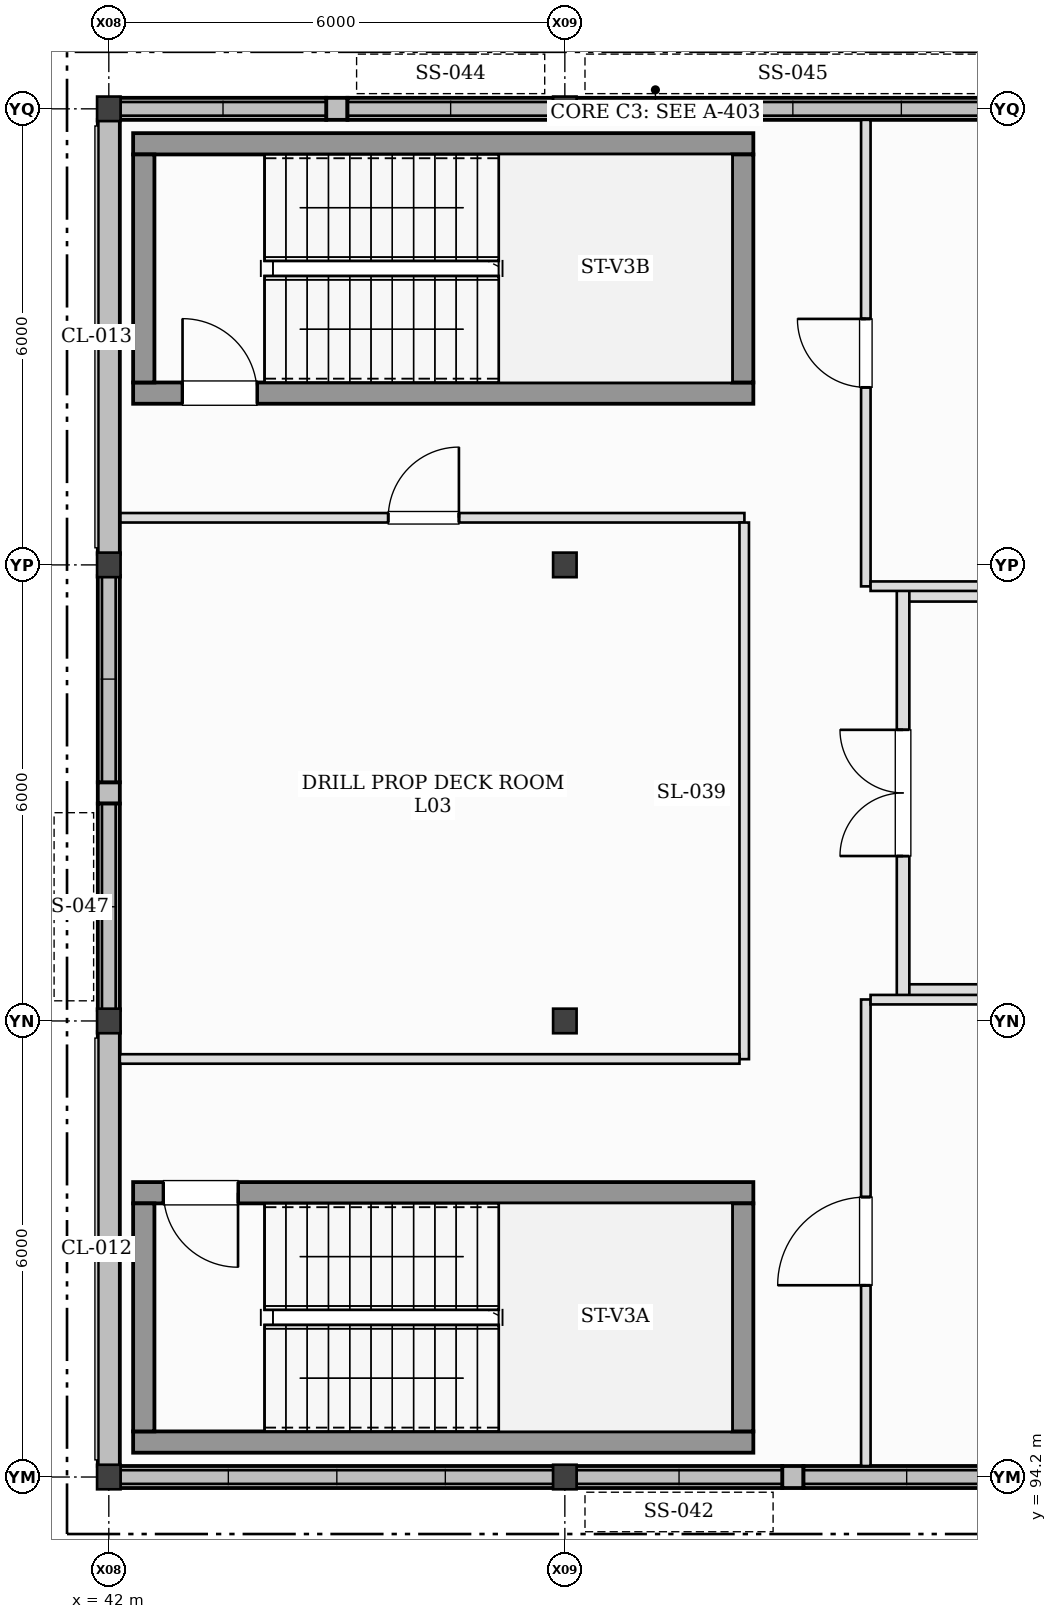
"""IFC4 building model, lengths in metres.
Left out: names, types, materials, properties, quantities, classifications, styles, units other than length and angle.
Written with IfcOpenShell. Run it as: python <this file> out.ifc"""

import sys

from ifc_helpers import new_model, si_unit, direction, frame, frame_2d, origin, origin_2d, place, context, subcontext, project, spatial, rectangle, i_section, extrude, element, fill, save


model = new_model("IFC4")
c1 = context("Model", 3, precision=1e-05, world=origin(), true_north=direction((0.0, 1.0)))
c2 = subcontext(c1, "Body", "Model", "MODEL_VIEW")
j1 = project(units=[si_unit("LENGTHUNIT", "METRE"), si_unit("PLANEANGLEUNIT", "RADIAN")], contexts=[c1])
p1 = place(None, origin())
s1 = spatial("IfcSite", under=j1, at=p1, CompositionType="ELEMENT")
p2 = place(p1, origin())
s2 = spatial("IfcBuilding", under=s1, at=p2, CompositionType="ELEMENT")
p3 = place(p2, frame((0.0, 0.0, 10.0)))
s3 = spatial("IfcBuildingStorey", under=s2, at=p3, CompositionType="ELEMENT", Elevation=10.0)
for number, where, z_axis, x_axis in (
    (1, (42.0, 94.2, 0.0), (0.0, 0.0, 1.0), (1.0, 0.0, 0.0)),
    (2, (42.0, 100.2, 0.0), (0.0, 0.0, 1.0), (1.0, 0.0, 0.0)),
    (3, (42.0, 106.2, 0.0), (0.0, 0.0, 1.0), (1.0, 0.0, 0.0)),
    (4, (42.0, 112.2, 0.0), (0.0, 0.0, 1.0), (1.0, 0.0, 0.0)),
    (5, (48.0, 94.2, 0.0), (0.0, 0.0, 1.0), (1.0, 0.0, 0.0)),
    (6, (48.0, 100.2, 0.0), (0.0, 0.0, 1.0), (1.0, 0.0, 0.0)),
    (7, (48.0, 106.2, 0.0), (0.0, 0.0, 1.0), (1.0, 0.0, 0.0)),
    (8, (48.0, 112.2, 0.0), (0.0, 0.0, 1.0), (1.0, 0.0, 0.0)),
):
    element("IfcColumn", number, at=place(p3, frame(where, z_axis=z_axis, x_axis=x_axis)), inside=s3, PredefinedType="COLUMN", context=c2, shape_type="SweptSolid", body=[
        extrude(i_section(OverallWidth=0.309, OverallDepth=0.323, WebThickness=0.013, FlangeThickness=0.023, at=origin_2d()), origin(), (0.0, 0.0, 1.0), 4.0),
    ])
p4 = place(p3, frame((42.145, 94.2, 0.0), z_axis=(0.0, 0.0, 1.0), x_axis=(1.0, 0.0, 0.0)))
e9 = element("IfcWall", 9, at=p4, inside=s3, PredefinedType="STANDARD", context=c2, shape_type="SweptSolid", body=[
    extrude(rectangle(XDim=5.71, YDim=0.29, at=frame_2d((2.855, 0.0))), origin(), (0.0, 0.0, 1.0), 0.68),
])
p5 = place(p3, frame((50.86, 94.2, 0.0), z_axis=(0.0, 0.0, 1.0), x_axis=(1.0, 0.0, 0.0)))
e10 = element("IfcWall", 10, at=p5, inside=s3, PredefinedType="STANDARD", context=c2, shape_type="SweptSolid", body=[
    extrude(rectangle(XDim=0.28, YDim=0.29, at=frame_2d((0.14, 0.0))), origin(), (0.0, 0.0, 1.0), 3.249),
])
p6 = place(p3, frame((48.145, 94.2, 0.0), z_axis=(0.0, 0.0, 1.0), x_axis=(1.0, 0.0, 0.0)))
e11 = element("IfcWall", 11, at=p6, inside=s3, PredefinedType="STANDARD", context=c2, shape_type="SweptSolid", body=[
    extrude(rectangle(XDim=2.715, YDim=0.29, at=frame_2d((1.357, 0.0))), origin(), (0.0, 0.0, 1.0), 0.8),
])
p7 = place(p3, frame((51.14, 94.2, 0.0), z_axis=(0.0, 0.0, 1.0), x_axis=(1.0, 0.0, 0.0)))
e12 = element("IfcWall", 12, at=p7, inside=s3, PredefinedType="STANDARD", context=c2, shape_type="SweptSolid", body=[
    extrude(rectangle(XDim=2.715, YDim=0.29, at=frame_2d((1.357, 0.0))), origin(), (0.0, 0.0, 1.0), 0.92),
])
p8 = place(p3, frame((45.14, 112.2, 0.0), z_axis=(0.0, 0.0, 1.0), x_axis=(-1.0, 0.0, 0.0)))
e13 = element("IfcWall", 13, at=p8, inside=s3, PredefinedType="STANDARD", context=c2, shape_type="SweptSolid", body=[
    extrude(rectangle(XDim=0.28, YDim=0.29, at=frame_2d((0.14, 0.0))), origin(), (0.0, 0.0, 1.0), 3.249),
])
p9 = place(p3, frame((47.855, 112.2, 0.0), z_axis=(0.0, 0.0, 1.0), x_axis=(-1.0, 0.0, 0.0)))
e14 = element("IfcWall", 14, at=p9, inside=s3, PredefinedType="STANDARD", context=c2, shape_type="SweptSolid", body=[
    extrude(rectangle(XDim=2.715, YDim=0.29, at=frame_2d((1.357, 0.0))), origin(), (0.0, 0.0, 1.0), 0.32),
])
p10 = place(p3, frame((44.86, 112.2, 0.0), z_axis=(0.0, 0.0, 1.0), x_axis=(-1.0, 0.0, 0.0)))
e15 = element("IfcWall", 15, at=p10, inside=s3, PredefinedType="STANDARD", context=c2, shape_type="SweptSolid", body=[
    extrude(rectangle(XDim=2.715, YDim=0.29, at=frame_2d((1.357, 0.0))), origin(), (0.0, 0.0, 1.0), 0.44),
])
p11 = place(p3, frame((53.855, 112.2, 0.0), z_axis=(0.0, 0.0, 1.0), x_axis=(-1.0, 0.0, 0.0)))
e16 = element("IfcWall", 16, at=p11, inside=s3, PredefinedType="STANDARD", context=c2, shape_type="SweptSolid", body=[
    extrude(rectangle(XDim=5.71, YDim=0.29, at=frame_2d((2.855, 0.0))), origin(), (0.0, 0.0, 1.0), 0.56),
])
p12 = place(p3, frame((42.0, 100.055, 0.0), z_axis=(0.0, 0.0, 1.0), x_axis=(0.0, -1.0, 0.0)))
e17 = element("IfcWall", 17, at=p12, inside=s3, PredefinedType="STANDARD", context=c2, shape_type="SweptSolid", body=[
    extrude(rectangle(XDim=5.71, YDim=0.29, at=frame_2d((2.855, 0.0))), origin(), (0.0, 0.0, 1.0), 3.253),
])
p13 = place(p3, frame((42.0, 103.34, 0.0), z_axis=(0.0, 0.0, 1.0), x_axis=(0.0, -1.0, 0.0)))
e18 = element("IfcWall", 18, at=p13, inside=s3, PredefinedType="STANDARD", context=c2, shape_type="SweptSolid", body=[
    extrude(rectangle(XDim=0.28, YDim=0.29, at=frame_2d((0.14, 0.0))), origin(), (0.0, 0.0, 1.0), 3.253),
])
p14 = place(p3, frame((42.0, 106.055, 0.0), z_axis=(0.0, 0.0, 1.0), x_axis=(0.0, -1.0, 0.0)))
e19 = element("IfcWall", 19, at=p14, inside=s3, PredefinedType="STANDARD", context=c2, shape_type="SweptSolid", body=[
    extrude(rectangle(XDim=2.715, YDim=0.29, at=frame_2d((1.357, 0.0))), origin(), (0.0, 0.0, 1.0), 0.68),
])
p15 = place(p3, frame((42.0, 103.06, 0.0), z_axis=(0.0, 0.0, 1.0), x_axis=(0.0, -1.0, 0.0)))
e20 = element("IfcWall", 20, at=p15, inside=s3, PredefinedType="STANDARD", context=c2, shape_type="SweptSolid", body=[
    extrude(rectangle(XDim=2.715, YDim=0.29, at=frame_2d((1.357, 0.0))), origin(), (0.0, 0.0, 1.0), 0.8),
])
p16 = place(p3, frame((42.0, 112.055, 0.0), z_axis=(0.0, 0.0, 1.0), x_axis=(0.0, -1.0, 0.0)))
e21 = element("IfcWall", 21, at=p16, inside=s3, PredefinedType="STANDARD", context=c2, shape_type="SweptSolid", body=[
    extrude(rectangle(XDim=5.71, YDim=0.29, at=frame_2d((2.855, 0.0))), origin(), (0.0, 0.0, 1.0), 3.253),
])
p17 = place(p3, frame((42.32, 94.66, 0.0), z_axis=(0.0, 0.0, 1.0), x_axis=(1.0, 0.0, 0.0)))
e22 = element("IfcWall", 22, at=p17, inside=s3, PredefinedType="SHEAR", context=c2, shape_type="SweptSolid", body=[
    extrude(rectangle(XDim=8.16, YDim=0.28, at=frame_2d((4.08, 0.0))), origin(), (0.0, 0.0, 1.0), 4.0),
])
p18 = place(p3, frame((50.48, 97.94, 0.0), z_axis=(0.0, 0.0, 1.0), x_axis=(-1.0, 0.0, 0.0)))
e23 = element("IfcWall", 23, at=p18, inside=s3, PredefinedType="SHEAR", context=c2, shape_type="SweptSolid", body=[
    extrude(rectangle(XDim=8.16, YDim=0.28, at=frame_2d((4.08, 0.0))), origin(), (0.0, 0.0, 1.0), 4.0),
])
p19 = place(p18, frame((6.78, 0.0, 0.0)))
e24 = element("IfcOpeningElement", 24, at=p19, cuts=e23, PredefinedType="OPENING", context=c2, shape_type="SweptSolid", body=[
    extrude(rectangle(XDim=0.98, YDim=2.15, at=frame_2d((0.49, 1.075))), frame((0.0, 0.15, 0.0), z_axis=(0.0, -1.0, 0.0), x_axis=(1.0, 0.0, 0.0)), (0.0, 0.0, 1.0), 0.3),
])
for number, where, z_axis, x_axis in (
    (25, (42.46, 97.8, 0.0), (0.0, 0.0, 1.0), (0.0, -1.0, 0.0)),
    (26, (50.34, 94.8, 0.0), (0.0, 0.0, 1.0), (0.0, 1.0, 0.0)),
):
    element("IfcWall", number, at=place(p3, frame(where, z_axis=z_axis, x_axis=x_axis)), inside=s3, PredefinedType="SHEAR", context=c2, shape_type="SweptSolid", body=[
        extrude(rectangle(XDim=3.0, YDim=0.28, at=frame_2d((1.5, 0.0))), origin(), (0.0, 0.0, 1.0), 4.0),
    ])
p20 = place(p3, frame((42.32, 108.46, 0.0), z_axis=(0.0, 0.0, 1.0), x_axis=(1.0, 0.0, 0.0)))
e27 = element("IfcWall", 27, at=p20, inside=s3, PredefinedType="SHEAR", context=c2, shape_type="SweptSolid", body=[
    extrude(rectangle(XDim=8.16, YDim=0.28, at=frame_2d((4.08, 0.0))), origin(), (0.0, 0.0, 1.0), 4.0),
])
p21 = place(p20, frame((0.65, 0.0, 0.0)))
e28 = element("IfcOpeningElement", 28, at=p21, cuts=e27, PredefinedType="OPENING", context=c2, shape_type="SweptSolid", body=[
    extrude(rectangle(XDim=0.98, YDim=2.15, at=frame_2d((0.49, 1.075))), frame((0.0, 0.15, 0.0), z_axis=(0.0, -1.0, 0.0), x_axis=(1.0, 0.0, 0.0)), (0.0, 0.0, 1.0), 0.3),
])
p22 = place(p3, frame((50.48, 111.74, 0.0), z_axis=(0.0, 0.0, 1.0), x_axis=(-1.0, 0.0, 0.0)))
e29 = element("IfcWall", 29, at=p22, inside=s3, PredefinedType="SHEAR", context=c2, shape_type="SweptSolid", body=[
    extrude(rectangle(XDim=8.16, YDim=0.28, at=frame_2d((4.08, 0.0))), origin(), (0.0, 0.0, 1.0), 4.0),
])
for number, where, z_axis, x_axis in (
    (30, (42.46, 111.6, 0.0), (0.0, 0.0, 1.0), (0.0, -1.0, 0.0)),
    (31, (50.34, 108.6, 0.0), (0.0, 0.0, 1.0), (0.0, 1.0, 0.0)),
):
    element("IfcWall", number, at=place(p3, frame(where, z_axis=z_axis, x_axis=x_axis)), inside=s3, PredefinedType="SHEAR", context=c2, shape_type="SweptSolid", body=[
        extrude(rectangle(XDim=3.0, YDim=0.28, at=frame_2d((1.5, 0.0))), origin(), (0.0, 0.0, 1.0), 4.0),
    ])
for number, where, z_axis, x_axis in (
    (32, (52.45, 100.6, 0.0), (0.0, 0.0, 1.0), (1.0, 0.0, 0.0)),
    (33, (56.448, 105.8, 0.0), (0.0, 0.0, 1.0), (-1.0, 0.0, 0.0)),
):
    element("IfcWall", number, at=place(p3, frame(where, z_axis=z_axis, x_axis=x_axis)), inside=s3, PredefinedType="PARTITIONING", context=c2, shape_type="SweptSolid", body=[
        extrude(rectangle(XDim=3.998, YDim=0.165, at=frame_2d((1.999, 0.0))), origin(), (0.0, 0.0, 1.0), 3.74),
    ])
p23 = place(p3, frame((52.45, 100.52, 0.0), z_axis=(0.0, 0.0, 1.0), x_axis=(0.0, 1.0, 0.0)))
e34 = element("IfcWall", 34, at=p23, inside=s3, PredefinedType="PARTITIONING", context=c2, shape_type="SweptSolid", body=[
    extrude(rectangle(XDim=5.36, YDim=0.165, at=frame_2d((2.68, 0.0))), origin(), (0.0, 0.0, 1.0), 3.74),
])
p24 = place(p23, frame((1.85, 0.0, 0.0)))
e35 = element("IfcOpeningElement", 35, at=p24, cuts=e34, PredefinedType="OPENING", context=c2, shape_type="SweptSolid", body=[
    extrude(rectangle(XDim=1.66, YDim=2.2, at=frame_2d((0.83, 1.1))), frame((0.0, 0.093, 0.0), z_axis=(0.0, -1.0, 0.0), x_axis=(1.0, 0.0, 0.0)), (0.0, 0.0, 1.0), 0.185),
])
p25 = place(p3, frame((42.145, 106.82, 0.0), z_axis=(0.0, 0.0, 1.0), x_axis=(1.0, 0.0, 0.0)))
e36 = element("IfcWall", 36, at=p25, inside=s3, PredefinedType="PARTITIONING", context=c2, shape_type="SweptSolid", body=[
    extrude(rectangle(XDim=8.218, YDim=0.125, at=frame_2d((4.109, 0.0))), origin(), (0.0, 0.0, 1.0), 3.74),
])
p26 = place(p25, frame((3.531, 0.0, 0.0)))
e37 = element("IfcOpeningElement", 37, at=p26, cuts=e36, PredefinedType="OPENING", context=c2, shape_type="SweptSolid", body=[
    extrude(rectangle(XDim=0.93, YDim=2.1, at=frame_2d((0.465, 1.05))), frame((0.0, 0.073, 0.0), z_axis=(0.0, -1.0, 0.0), x_axis=(1.0, 0.0, 0.0)), (0.0, 0.0, 1.0), 0.145),
])
p27 = place(p3, frame((50.36, 106.758, 0.0), z_axis=(0.0, 0.0, 1.0), x_axis=(0.0, -1.0, 0.0)))
e38 = element("IfcWall", 38, at=p27, inside=s3, PredefinedType="PARTITIONING", context=c2, shape_type="SweptSolid", body=[
    extrude(rectangle(XDim=7.06, YDim=0.125, at=frame_2d((3.53, 0.0))), origin(), (0.0, 0.0, 1.0), 3.74),
])
p28 = place(p3, frame((50.298, 99.7, 0.0), z_axis=(0.0, 0.0, 1.0), x_axis=(-1.0, 0.0, 0.0)))
e39 = element("IfcWall", 39, at=p28, inside=s3, PredefinedType="PARTITIONING", context=c2, shape_type="SweptSolid", body=[
    extrude(rectangle(XDim=8.153, YDim=0.125, at=frame_2d((4.076, 0.0))), origin(), (0.0, 0.0, 1.0), 3.74),
])
p29 = place(p3, frame((51.96, 94.345, 0.0), z_axis=(0.0, 0.0, 1.0), x_axis=(0.0, 1.0, 0.0)))
e40 = element("IfcWall", 40, at=p29, inside=s3, PredefinedType="PARTITIONING", context=c2, shape_type="SweptSolid", body=[
    extrude(rectangle(XDim=6.137, YDim=0.125, at=frame_2d((3.069, 0.0))), origin(), (0.0, 0.0, 1.0), 3.399),
])
p30 = place(p29, frame((2.378, 0.0, 0.0)))
e41 = element("IfcOpeningElement", 41, at=p30, cuts=e40, PredefinedType="OPENING", context=c2, shape_type="SweptSolid", body=[
    extrude(rectangle(XDim=1.16, YDim=2.2, at=frame_2d((0.58, 1.1))), frame((0.0, 0.073, 0.0), z_axis=(0.0, -1.0, 0.0), x_axis=(1.0, 0.0, 0.0)), (0.0, 0.0, 1.0), 0.145),
])
p31 = place(p3, frame((52.022, 100.48, 0.0), z_axis=(0.0, 0.0, 1.0), x_axis=(1.0, 0.0, 0.0)))
e42 = element("IfcWall", 42, at=p31, inside=s3, PredefinedType="PARTITIONING", context=c2, shape_type="SweptSolid", body=[
    extrude(rectangle(XDim=7.833, YDim=0.125, at=frame_2d((3.916, 0.0))), origin(), (0.0, 0.0, 1.0), 3.249),
])
p32 = place(p3, frame((51.96, 105.917, 0.0), z_axis=(0.0, 0.0, 1.0), x_axis=(0.0, 1.0, 0.0)))
e43 = element("IfcWall", 43, at=p32, inside=s3, PredefinedType="PARTITIONING", context=c2, shape_type="SweptSolid", body=[
    extrude(rectangle(XDim=6.137, YDim=0.125, at=frame_2d((3.069, 0.0))), origin(), (0.0, 0.0, 1.0), 3.399),
])
p33 = place(p32, frame((2.619, 0.0, 0.0)))
e44 = element("IfcOpeningElement", 44, at=p33, cuts=e43, PredefinedType="OPENING", context=c2, shape_type="SweptSolid", body=[
    extrude(rectangle(XDim=0.9, YDim=2.1, at=frame_2d((0.45, 1.05))), frame((0.0, 0.073, 0.0), z_axis=(0.0, -1.0, 0.0), x_axis=(1.0, 0.0, 0.0)), (0.0, 0.0, 1.0), 0.145),
])
p34 = place(p3, frame((59.855, 105.92, 0.0), z_axis=(0.0, 0.0, 1.0), x_axis=(-1.0, 0.0, 0.0)))
e45 = element("IfcWall", 45, at=p34, inside=s3, PredefinedType="PARTITIONING", context=c2, shape_type="SweptSolid", body=[
    extrude(rectangle(XDim=7.833, YDim=0.125, at=frame_2d((3.916, 0.0))), origin(), (0.0, 0.0, 1.0), 3.249),
])
p35 = place(p19, origin())
e46 = element("IfcDoor", 46, at=p35, inside=s3, OperationType="SINGLE_SWING_LEFT", PredefinedType="DOOR", context=c2, shape_type="SweptSolid", body=[
    extrude(rectangle(XDim=0.98, YDim=2.15, at=frame_2d((0.49, 1.075))), frame((0.0, 0.025, 0.0), z_axis=(0.0, -1.0, 0.0), x_axis=(1.0, 0.0, 0.0)), (0.0, 0.0, 1.0), 0.05),
])
fill(e24, e46)
p36 = place(p21, origin())
e47 = element("IfcDoor", 47, at=p36, inside=s3, OperationType="SINGLE_SWING_LEFT", PredefinedType="DOOR", context=c2, shape_type="SweptSolid", body=[
    extrude(rectangle(XDim=0.98, YDim=2.15, at=frame_2d((0.49, 1.075))), frame((0.0, 0.025, 0.0), z_axis=(0.0, -1.0, 0.0), x_axis=(1.0, 0.0, 0.0)), (0.0, 0.0, 1.0), 0.05),
])
fill(e28, e47)
p37 = place(p24, frame((1.66, 0.0, 0.0), z_axis=(0.0, 0.0, 1.0), x_axis=(-1.0, 0.0, 0.0)))
e48 = element("IfcDoor", 48, at=p37, inside=s3, OperationType="DOUBLE_DOOR_SINGLE_SWING", PredefinedType="DOOR", context=c2, shape_type="SweptSolid", body=[
    extrude(rectangle(XDim=1.66, YDim=2.2, at=frame_2d((0.83, 1.1))), frame((0.0, 0.025, 0.0), z_axis=(0.0, -1.0, 0.0), x_axis=(1.0, 0.0, 0.0)), (0.0, 0.0, 1.0), 0.05),
])
fill(e35, e48)
p38 = place(p26, frame((0.93, 0.0, 0.0), z_axis=(0.0, 0.0, 1.0), x_axis=(-1.0, 0.0, 0.0)))
e49 = element("IfcDoor", 49, at=p38, inside=s3, OperationType="SINGLE_SWING_RIGHT", PredefinedType="DOOR", context=c2, shape_type="SweptSolid", body=[
    extrude(rectangle(XDim=0.93, YDim=2.1, at=frame_2d((0.465, 1.05))), frame((0.0, 0.025, 0.0), z_axis=(0.0, -1.0, 0.0), x_axis=(1.0, 0.0, 0.0)), (0.0, 0.0, 1.0), 0.05),
])
fill(e37, e49)
p39 = place(p30, frame((1.16, 0.0, 0.0), z_axis=(0.0, 0.0, 1.0), x_axis=(-1.0, 0.0, 0.0)))
e50 = element("IfcDoor", 50, at=p39, inside=s3, OperationType="SINGLE_SWING_LEFT", PredefinedType="DOOR", context=c2, shape_type="SweptSolid", body=[
    extrude(rectangle(XDim=1.16, YDim=2.2, at=frame_2d((0.58, 1.1))), frame((0.0, 0.025, 0.0), z_axis=(0.0, -1.0, 0.0), x_axis=(1.0, 0.0, 0.0)), (0.0, 0.0, 1.0), 0.05),
])
fill(e41, e50)
p40 = place(p33, frame((0.9, 0.0, 0.0), z_axis=(0.0, 0.0, 1.0), x_axis=(-1.0, 0.0, 0.0)))
e51 = element("IfcDoor", 51, at=p40, inside=s3, OperationType="SINGLE_SWING_RIGHT", PredefinedType="DOOR", context=c2, shape_type="SweptSolid", body=[
    extrude(rectangle(XDim=0.9, YDim=2.1, at=frame_2d((0.45, 1.05))), frame((0.0, 0.025, 0.0), z_axis=(0.0, -1.0, 0.0), x_axis=(1.0, 0.0, 0.0)), (0.0, 0.0, 1.0), 0.05),
])
fill(e44, e51)
save(model, sys.argv[1])
